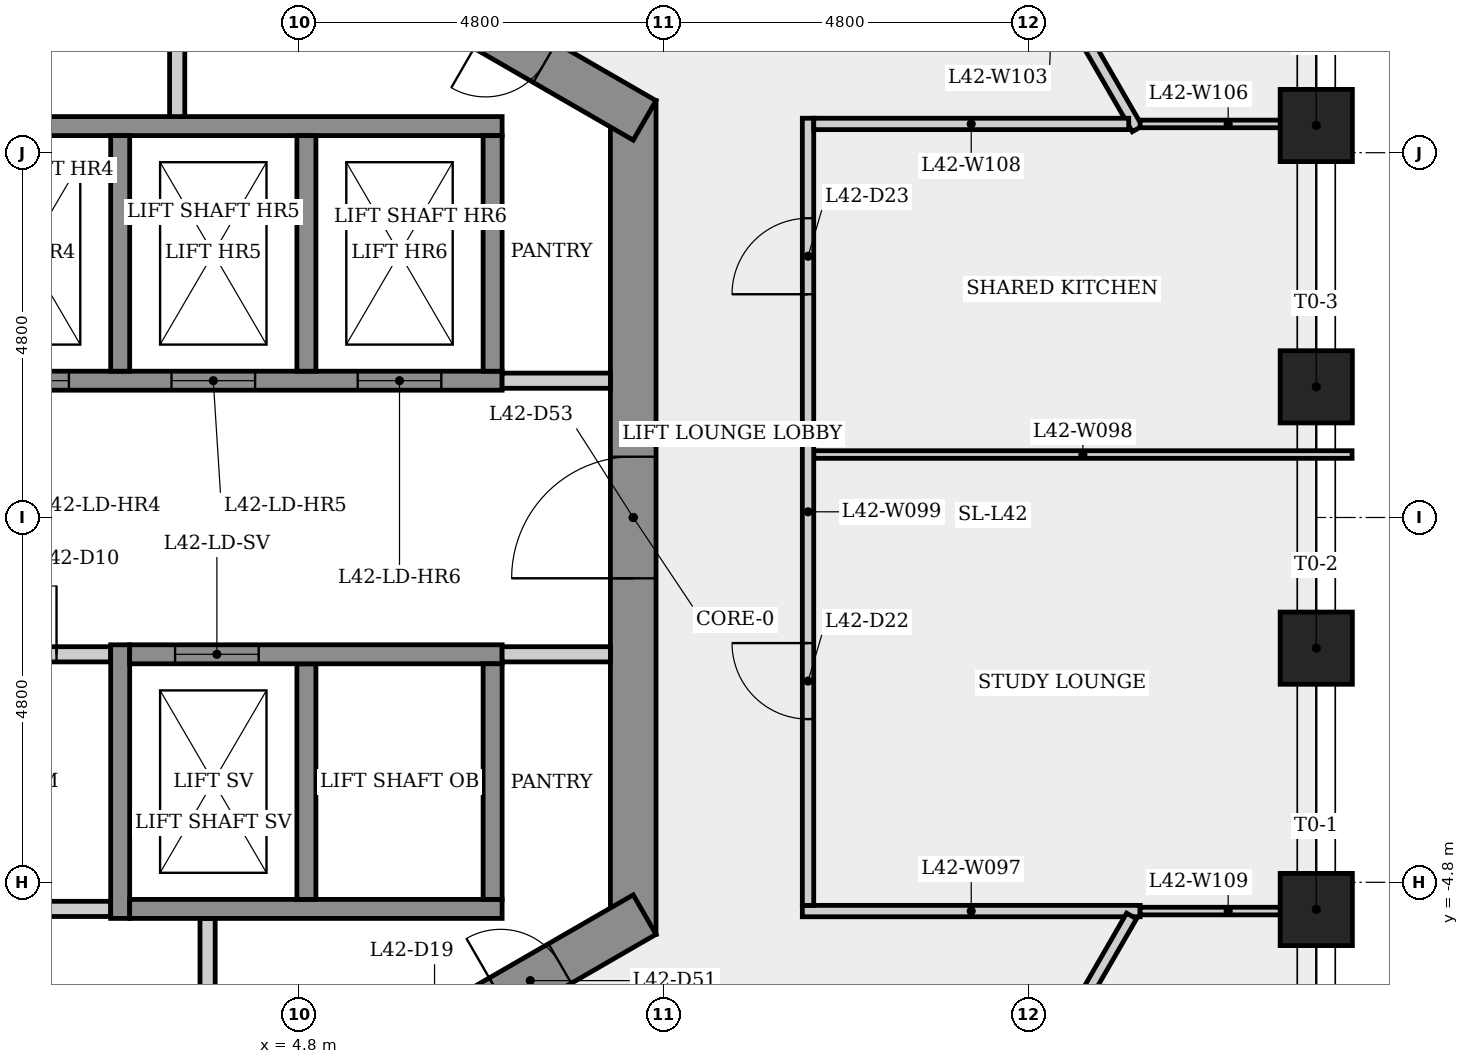
"""IFC4 building model, lengths in metres.
Left out: names, types, materials, properties, quantities, classifications, styles, units other than length and angle.
Written with IfcOpenShell. Run it as: python <this file> out.ifc"""

import sys

from ifc_helpers import new_model, si_unit, direction, frame, frame_2d, origin, origin_2d, place, context, subcontext, project, spatial, rectangle, extrude, element, fill, save


model = new_model("IFC4")
c1 = context("Model", 3, precision=1e-05, world=origin(), true_north=direction((0.0, 1.0)))
c2 = subcontext(c1, "Body", "Model", "MODEL_VIEW")
j1 = project(units=[si_unit("LENGTHUNIT", "METRE"), si_unit("PLANEANGLEUNIT", "RADIAN")], contexts=[c1])
p1 = place(None, origin())
s1 = spatial("IfcSite", under=j1, at=p1, CompositionType="ELEMENT")
p2 = place(p1, origin())
s2 = spatial("IfcBuilding", under=s1, at=p2, CompositionType="ELEMENT")
p3 = place(p2, frame((0.0, 0.0, 159.5)))
s3 = spatial("IfcBuildingStorey", under=s2, at=p3, CompositionType="ELEMENT", Elevation=159.5)
p4 = place(p3, frame((9.2, -5.485, 0.0), z_axis=(0.0, 0.0, 1.0), x_axis=(0.0, 1.0, 0.0)))
e1 = element("IfcWall", 1, at=p4, inside=s3, PredefinedType="SHEAR", context=c2, shape_type="SweptSolid", body=[
    extrude(rectangle(XDim=10.97, YDim=0.6, at=frame_2d((5.485, 0.0))), origin(), (0.0, 0.0, 1.0), 3.4),
])
p5 = place(p4, frame((4.685, 0.0, 0.0)))
e2 = element("IfcOpeningElement", 2, at=p5, cuts=e1, PredefinedType="OPENING", context=c2, shape_type="SweptSolid", body=[
    extrude(rectangle(XDim=1.6, YDim=2.1, at=frame_2d((0.8, 1.05))), frame((0.0, 0.31, 0.0), z_axis=(0.0, -1.0, 0.0), x_axis=(1.0, 0.0, 0.0)), (0.0, 0.0, 1.0), 0.62),
])
p6 = place(p3, frame((9.35, 5.225, 0.0), z_axis=(0.0, 0.0, 1.0), x_axis=(-0.866023993627, 0.500002442456, 0.0)))
e3 = element("IfcWall", 3, at=p6, inside=s3, PredefinedType="SHEAR", context=c2, shape_type="SweptSolid", body=[
    extrude(rectangle(XDim=10.97, YDim=0.6, at=frame_2d((5.485, 0.0))), origin(), (0.0, 0.0, 1.0), 3.4),
])
p7 = place(p6, frame((8.325, 0.0, 0.0)))
e4 = element("IfcOpeningElement", 4, at=p7, cuts=e3, PredefinedType="OPENING", context=c2, shape_type="SweptSolid", body=[
    extrude(rectangle(XDim=0.9, YDim=2.1, at=frame_2d((0.45, 1.05))), frame((0.0, 0.31, 0.0), z_axis=(0.0, -1.0, 0.0), x_axis=(1.0, 0.0, 0.0)), (0.0, 0.0, 1.0), 0.62),
])
p8 = place(p6, frame((1.518, 0.0, 0.0)))
e5 = element("IfcOpeningElement", 5, at=p8, cuts=e3, PredefinedType="OPENING", context=c2, shape_type="SweptSolid", body=[
    extrude(rectangle(XDim=0.9, YDim=2.1, at=frame_2d((0.45, 1.05))), frame((0.0, 0.31, 0.0), z_axis=(0.0, -1.0, 0.0), x_axis=(1.0, 0.0, 0.0)), (0.0, 0.0, 1.0), 0.62),
])
p9 = place(p3, frame((-0.15, -10.71, 0.0), z_axis=(0.0, 0.0, 1.0), x_axis=(0.866023993627, 0.500002442456, 0.0)))
e6 = element("IfcWall", 6, at=p9, inside=s3, PredefinedType="SHEAR", context=c2, shape_type="SweptSolid", body=[
    extrude(rectangle(XDim=10.97, YDim=0.6, at=frame_2d((5.485, 0.0))), origin(), (0.0, 0.0, 1.0), 3.4),
])
p10 = place(p9, frame((1.975, 0.0, 0.0)))
e7 = element("IfcOpeningElement", 7, at=p10, cuts=e6, PredefinedType="OPENING", context=c2, shape_type="SweptSolid", body=[
    extrude(rectangle(XDim=0.9, YDim=2.1, at=frame_2d((0.45, 1.05))), frame((0.0, 0.31, 0.0), z_axis=(0.0, -1.0, 0.0), x_axis=(1.0, 0.0, 0.0)), (0.0, 0.0, 1.0), 0.62),
])
p11 = place(p9, frame((8.782, 0.0, 0.0)))
e8 = element("IfcOpeningElement", 8, at=p11, cuts=e6, PredefinedType="OPENING", context=c2, shape_type="SweptSolid", body=[
    extrude(rectangle(XDim=0.9, YDim=2.1, at=frame_2d((0.45, 1.05))), frame((0.0, 0.31, 0.0), z_axis=(0.0, -1.0, 0.0), x_axis=(1.0, 0.0, 0.0)), (0.0, 0.0, 1.0), 0.62),
])
for number, where, z_axis, x_axis in (
    (9, (18.187, -5.158, 0.0), (0.0, 0.0, 1.0), (1.0, 0.0, 0.0)),
    (10, (18.187, -1.719, 0.0), (0.0, 0.0, 1.0), (1.0, 0.0, 0.0)),
    (11, (18.187, 1.719, 0.0), (0.0, 0.0, 1.0), (1.0, 0.0, 0.0)),
    (12, (18.187, 5.158, 0.0), (0.0, 0.0, 1.0), (1.0, 0.0, 0.0)),
):
    element("IfcColumn", number, at=place(p3, frame(where, z_axis=z_axis, x_axis=x_axis)), inside=s3, PredefinedType="COLUMN", context=c2, shape_type="SweptSolid", body=[
        extrude(rectangle(XDim=0.95, YDim=0.95, at=origin_2d()), origin(), (0.0, 0.0, 1.0), 3.4),
    ])
p12 = place(p3, frame((-8.88, -5.15, 0.0), z_axis=(0.0, 0.0, 1.0), x_axis=(1.0, 0.0, 0.0)))
e13 = element("IfcWall", 13, at=p12, inside=s3, PredefinedType="PARTITIONING", context=c2, shape_type="SweptSolid", body=[
    extrude(rectangle(XDim=11.205, YDim=0.2, at=frame_2d((5.603, 0.0))), origin(), (0.0, 0.0, 1.0), 3.05),
])
p13 = place(p3, frame((-7.475, 1.8, 0.0), z_axis=(0.0, 0.0, 1.0), x_axis=(1.0, 0.0, 0.0)))
e14 = element("IfcWall", 14, at=p13, inside=s3, PredefinedType="SHEAR", context=c2, shape_type="SweptSolid", body=[
    extrude(rectangle(XDim=14.95, YDim=0.25, at=frame_2d((7.475, 0.0))), origin(), (0.0, 0.0, 1.0), 3.05),
])
p14 = place(p13, frame((0.8, 0.0, 0.0)))
e15 = element("IfcOpeningElement", 15, at=p14, cuts=e14, PredefinedType="OPENING", context=c2, shape_type="SweptSolid", body=[
    extrude(rectangle(XDim=1.1, YDim=2.1, at=frame_2d((0.55, 1.05))), frame((0.0, 0.135, 0.0), z_axis=(0.0, -1.0, 0.0), x_axis=(1.0, 0.0, 0.0)), (0.0, 0.0, 1.0), 0.27),
])
p15 = place(p13, frame((3.25, 0.0, 0.0)))
e16 = element("IfcOpeningElement", 16, at=p15, cuts=e14, PredefinedType="OPENING", context=c2, shape_type="SweptSolid", body=[
    extrude(rectangle(XDim=1.1, YDim=2.1, at=frame_2d((0.55, 1.05))), frame((0.0, 0.135, 0.0), z_axis=(0.0, -1.0, 0.0), x_axis=(1.0, 0.0, 0.0)), (0.0, 0.0, 1.0), 0.27),
])
p16 = place(p13, frame((5.7, 0.0, 0.0)))
e17 = element("IfcOpeningElement", 17, at=p16, cuts=e14, PredefinedType="OPENING", context=c2, shape_type="SweptSolid", body=[
    extrude(rectangle(XDim=1.1, YDim=2.1, at=frame_2d((0.55, 1.05))), frame((0.0, 0.135, 0.0), z_axis=(0.0, -1.0, 0.0), x_axis=(1.0, 0.0, 0.0)), (0.0, 0.0, 1.0), 0.27),
])
p17 = place(p13, frame((8.15, 0.0, 0.0)))
e18 = element("IfcOpeningElement", 18, at=p17, cuts=e14, PredefinedType="OPENING", context=c2, shape_type="SweptSolid", body=[
    extrude(rectangle(XDim=1.1, YDim=2.1, at=frame_2d((0.55, 1.05))), frame((0.0, 0.135, 0.0), z_axis=(0.0, -1.0, 0.0), x_axis=(1.0, 0.0, 0.0)), (0.0, 0.0, 1.0), 0.27),
])
p18 = place(p13, frame((10.6, 0.0, 0.0)))
e19 = element("IfcOpeningElement", 19, at=p18, cuts=e14, PredefinedType="OPENING", context=c2, shape_type="SweptSolid", body=[
    extrude(rectangle(XDim=1.1, YDim=2.1, at=frame_2d((0.55, 1.05))), frame((0.0, 0.135, 0.0), z_axis=(0.0, -1.0, 0.0), x_axis=(1.0, 0.0, 0.0)), (0.0, 0.0, 1.0), 0.27),
])
p19 = place(p13, frame((13.05, 0.0, 0.0)))
e20 = element("IfcOpeningElement", 20, at=p19, cuts=e14, PredefinedType="OPENING", context=c2, shape_type="SweptSolid", body=[
    extrude(rectangle(XDim=1.1, YDim=2.1, at=frame_2d((0.55, 1.05))), frame((0.0, 0.135, 0.0), z_axis=(0.0, -1.0, 0.0), x_axis=(1.0, 0.0, 0.0)), (0.0, 0.0, 1.0), 0.27),
])
p20 = place(p3, frame((-7.225, 5.15, 0.0), z_axis=(0.0, 0.0, 1.0), x_axis=(1.0, 0.0, 0.0)))
e21 = element("IfcWall", 21, at=p20, inside=s3, PredefinedType="SHEAR", context=c2, shape_type="SweptSolid", body=[
    extrude(rectangle(XDim=14.7, YDim=0.25, at=frame_2d((7.35, 0.0))), origin(), (0.0, 0.0, 1.0), 3.05),
])
p21 = place(p3, frame((-8.9, -1.8, 0.0), z_axis=(0.0, 0.0, 1.0), x_axis=(1.0, 0.0, 0.0)))
e22 = element("IfcWall", 22, at=p21, inside=s3, PredefinedType="PARTITIONING", context=c2, shape_type="SweptSolid", body=[
    extrude(rectangle(XDim=11.225, YDim=0.2, at=frame_2d((5.613, 0.0))), origin(), (0.0, 0.0, 1.0), 3.05),
])
p22 = place(p21, frame((2.135, 0.0, 0.0)))
e23 = element("IfcOpeningElement", 23, at=p22, cuts=e22, PredefinedType="OPENING", context=c2, shape_type="SweptSolid", body=[
    extrude(rectangle(XDim=0.9, YDim=2.1, at=frame_2d((0.45, 1.05))), frame((0.0, 0.11, 0.0), z_axis=(0.0, -1.0, 0.0), x_axis=(1.0, 0.0, 0.0)), (0.0, 0.0, 1.0), 0.22),
])
p23 = place(p21, frame((6.61, 0.0, 0.0)))
e24 = element("IfcOpeningElement", 24, at=p23, cuts=e22, PredefinedType="OPENING", context=c2, shape_type="SweptSolid", body=[
    extrude(rectangle(XDim=0.9, YDim=2.1, at=frame_2d((0.45, 1.05))), frame((0.0, 0.11, 0.0), z_axis=(0.0, -1.0, 0.0), x_axis=(1.0, 0.0, 0.0)), (0.0, 0.0, 1.0), 0.22),
])
p24 = place(p21, frame((9.613, 0.0, 0.0)))
e25 = element("IfcOpeningElement", 25, at=p24, cuts=e22, PredefinedType="OPENING", context=c2, shape_type="SweptSolid", body=[
    extrude(rectangle(XDim=0.9, YDim=2.1, at=frame_2d((0.45, 1.05))), frame((0.0, 0.11, 0.0), z_axis=(0.0, -1.0, 0.0), x_axis=(1.0, 0.0, 0.0)), (0.0, 0.0, 1.0), 0.22),
])
p25 = place(p3, frame((2.45, -5.275, 0.0), z_axis=(0.0, 0.0, 1.0), x_axis=(0.0, 1.0, 0.0)))
e26 = element("IfcWall", 26, at=p25, inside=s3, PredefinedType="SHEAR", context=c2, shape_type="SweptSolid", body=[
    extrude(rectangle(XDim=3.6, YDim=0.25, at=frame_2d((1.8, 0.0))), origin(), (0.0, 0.0, 1.0), 3.05),
])
p26 = place(p3, frame((2.45, 5.025, 0.0), z_axis=(0.0, 0.0, 1.0), x_axis=(0.0, -1.0, 0.0)))
e27 = element("IfcWall", 27, at=p26, inside=s3, PredefinedType="SHEAR", context=c2, shape_type="SweptSolid", body=[
    extrude(rectangle(XDim=3.1, YDim=0.25, at=frame_2d((1.55, 0.0))), origin(), (0.0, 0.0, 1.0), 3.4),
])
p27 = place(p3, frame((3.2, 8.429, 0.0), z_axis=(0.0, 0.0, 1.0), x_axis=(0.0, -1.0, 0.0)))
e28 = element("IfcWall", 28, at=p27, inside=s3, PredefinedType="PARTITIONING", context=c2, shape_type="SweptSolid", body=[
    extrude(rectangle(XDim=3.154, YDim=0.2, at=frame_2d((1.577, 0.0))), origin(), (0.0, 0.0, 1.0), 3.05),
])
p28 = place(p3, frame((3.6, -5.275, 0.0), z_axis=(0.0, 0.0, 1.0), x_axis=(0.0, -1.0, 0.0)))
e29 = element("IfcWall", 29, at=p28, inside=s3, PredefinedType="PARTITIONING", context=c2, shape_type="SweptSolid", body=[
    extrude(rectangle(XDim=2.924, YDim=0.2, at=frame_2d((1.462, 0.0))), origin(), (0.0, 0.0, 1.0), 3.05),
])
p29 = place(p3, frame((2.575, -5.15, 0.0), z_axis=(0.0, 0.0, 1.0), x_axis=(1.0, 0.0, 0.0)))
e30 = element("IfcWall", 30, at=p29, inside=s3, PredefinedType="SHEAR", context=c2, shape_type="SweptSolid", body=[
    extrude(rectangle(XDim=4.9, YDim=0.25, at=frame_2d((2.45, 0.0))), origin(), (0.0, 0.0, 1.0), 3.05),
])
for number, where, z_axis, x_axis in (
    (31, (4.9, -1.925, 0.0), (0.0, 0.0, 1.0), (0.0, -1.0, 0.0)),
    (32, (4.9, 5.025, 0.0), (0.0, 0.0, 1.0), (0.0, -1.0, 0.0)),
):
    element("IfcWall", number, at=place(p3, frame(where, z_axis=z_axis, x_axis=x_axis)), inside=s3, PredefinedType="SHEAR", context=c2, shape_type="SweptSolid", body=[
        extrude(rectangle(XDim=3.1, YDim=0.25, at=frame_2d((1.55, 0.0))), origin(), (0.0, 0.0, 1.0), 3.4),
    ])
p30 = place(p3, frame((2.575, -1.8, 0.0), z_axis=(0.0, 0.0, 1.0), x_axis=(1.0, 0.0, 0.0)))
e33 = element("IfcWall", 33, at=p30, inside=s3, PredefinedType="SHEAR", context=c2, shape_type="SweptSolid", body=[
    extrude(rectangle(XDim=4.9, YDim=0.25, at=frame_2d((2.45, 0.0))), origin(), (0.0, 0.0, 1.0), 3.05),
])
p31 = place(p30, frame((0.597, 0.0, 0.0)))
e34 = element("IfcOpeningElement", 34, at=p31, cuts=e33, PredefinedType="OPENING", context=c2, shape_type="SweptSolid", body=[
    extrude(rectangle(XDim=1.1, YDim=2.1, at=frame_2d((0.55, 1.05))), frame((0.0, 0.135, 0.0), z_axis=(0.0, -1.0, 0.0), x_axis=(1.0, 0.0, 0.0)), (0.0, 0.0, 1.0), 0.27),
])
p32 = place(p3, frame((7.475, 1.8, 0.0), z_axis=(0.0, 0.0, 1.0), x_axis=(1.0, 0.0, 0.0)))
e35 = element("IfcWall", 35, at=p32, inside=s3, PredefinedType="PARTITIONING", context=c2, shape_type="SweptSolid", body=[
    extrude(rectangle(XDim=1.425, YDim=0.2, at=frame_2d((0.712, 0.0))), origin(), (0.0, 0.0, 1.0), 3.05),
])
for number, where, z_axis, x_axis in (
    (36, (7.35, -1.925, 0.0), (0.0, 0.0, 1.0), (0.0, -1.0, 0.0)),
    (37, (7.35, 5.025, 0.0), (0.0, 0.0, 1.0), (0.0, -1.0, 0.0)),
):
    element("IfcWall", number, at=place(p3, frame(where, z_axis=z_axis, x_axis=x_axis)), inside=s3, PredefinedType="SHEAR", context=c2, shape_type="SweptSolid", body=[
        extrude(rectangle(XDim=3.1, YDim=0.25, at=frame_2d((1.55, 0.0))), origin(), (0.0, 0.0, 1.0), 3.4),
    ])
p33 = place(p3, frame((8.9, -1.8, 0.0), z_axis=(0.0, 0.0, 1.0), x_axis=(-1.0, 0.0, 0.0)))
e38 = element("IfcWall", 38, at=p33, inside=s3, PredefinedType="PARTITIONING", context=c2, shape_type="SweptSolid", body=[
    extrude(rectangle(XDim=1.425, YDim=0.2, at=frame_2d((0.712, 0.0))), origin(), (0.0, 0.0, 1.0), 3.05),
])
p34 = place(p3, frame((11.425, -5.178, 0.0), z_axis=(0.0, 0.0, 1.0), x_axis=(1.0, 0.0, 0.0)))
e39 = element("IfcWall", 39, at=p34, inside=s3, PredefinedType="PARTITIONING", context=c2, shape_type="SweptSolid", body=[
    extrude(rectangle(XDim=4.444, YDim=0.15, at=frame_2d((2.222, 0.0))), origin(), (0.0, 0.0, 1.0), 3.05),
])
p35 = place(p3, frame((11.575, 0.829, 0.0), z_axis=(0.0, 0.0, 1.0), x_axis=(1.0, 0.0, 0.0)))
e40 = element("IfcWall", 40, at=p35, inside=s3, PredefinedType="PARTITIONING", context=c2, shape_type="SweptSolid", body=[
    extrude(rectangle(XDim=7.083, YDim=0.1, at=frame_2d((3.541, 0.0))), origin(), (0.0, 0.0, 1.0), 3.05),
])
p36 = place(p3, frame((11.5, -5.104, 0.0), z_axis=(0.0, 0.0, 1.0), x_axis=(0.0, 1.0, 0.0)))
e41 = element("IfcWall", 41, at=p36, inside=s3, PredefinedType="PARTITIONING", context=c2, shape_type="SweptSolid", body=[
    extrude(rectangle(XDim=10.357, YDim=0.15, at=frame_2d((5.178, 0.0))), origin(), (0.0, 0.0, 1.0), 3.05),
])
p37 = place(p36, frame((2.451, 0.0, 0.0)))
e42 = element("IfcOpeningElement", 42, at=p37, cuts=e41, PredefinedType="OPENING", context=c2, shape_type="SweptSolid", body=[
    extrude(rectangle(XDim=1.0, YDim=2.1, at=frame_2d((0.5, 1.05))), frame((0.0, 0.085, 0.0), z_axis=(0.0, -1.0, 0.0), x_axis=(1.0, 0.0, 0.0)), (0.0, 0.0, 1.0), 0.17),
])
p38 = place(p36, frame((8.041, 0.0, 0.0)))
e43 = element("IfcOpeningElement", 43, at=p38, cuts=e41, PredefinedType="OPENING", context=c2, shape_type="SweptSolid", body=[
    extrude(rectangle(XDim=1.0, YDim=2.1, at=frame_2d((0.5, 1.05))), frame((0.0, 0.085, 0.0), z_axis=(0.0, -1.0, 0.0), x_axis=(1.0, 0.0, 0.0)), (0.0, 0.0, 1.0), 0.17),
])
p39 = place(p3, frame((13.611, 8.959, 0.0), z_axis=(0.0, 0.0, 1.0), x_axis=(0.50000642917, -0.866021691869, 0.0)))
e44 = element("IfcWall", 44, at=p39, inside=s3, PredefinedType="PARTITIONING", context=c2, shape_type="SweptSolid", body=[
    extrude(rectangle(XDim=4.44, YDim=0.15, at=frame_2d((2.22, 0.0))), origin(), (0.0, 0.0, 1.0), 3.05),
])
p40 = place(p39, frame((1.665, 0.0, 0.0)))
e45 = element("IfcOpeningElement", 45, at=p40, cuts=e44, PredefinedType="OPENING", context=c2, shape_type="SweptSolid", body=[
    extrude(rectangle(XDim=1.0, YDim=2.1, at=frame_2d((0.5, 1.05))), frame((0.0, 0.085, 0.0), z_axis=(0.0, -1.0, 0.0), x_axis=(1.0, 0.0, 0.0)), (0.0, 0.0, 1.0), 0.17),
])
p41 = place(p3, frame((15.869, 5.178, 0.0), z_axis=(0.0, 0.0, 1.0), x_axis=(1.0, 0.0, 0.0)))
e46 = element("IfcWall", 46, at=p41, inside=s3, PredefinedType="PARTITIONING", context=c2, shape_type="SweptSolid", body=[
    extrude(rectangle(XDim=2.318, YDim=0.1, at=frame_2d((1.159, 0.0))), origin(), (0.0, 0.0, 1.0), 3.05),
])
p42 = place(p3, frame((15.757, -5.243, 0.0), z_axis=(0.0, 0.0, 1.0), x_axis=(-0.500001355988, -0.866024620903, 0.0)))
e47 = element("IfcWall", 47, at=p42, inside=s3, PredefinedType="PARTITIONING", context=c2, shape_type="SweptSolid", body=[
    extrude(rectangle(XDim=7.805, YDim=0.15, at=frame_2d((3.902, 0.0))), origin(), (0.0, 0.0, 1.0), 3.05),
])
p43 = place(p42, frame((3.402, 0.0, 0.0)))
e48 = element("IfcOpeningElement", 48, at=p43, cuts=e47, PredefinedType="OPENING", context=c2, shape_type="SweptSolid", body=[
    extrude(rectangle(XDim=1.0, YDim=2.1, at=frame_2d((0.5, 1.05))), frame((0.0, 0.085, 0.0), z_axis=(0.0, -1.0, 0.0), x_axis=(1.0, 0.0, 0.0)), (0.0, 0.0, 1.0), 0.17),
])
p44 = place(p3, frame((15.719, 5.178, 0.0), z_axis=(0.0, 0.0, 1.0), x_axis=(-1.0, 0.0, 0.0)))
e49 = element("IfcWall", 49, at=p44, inside=s3, PredefinedType="PARTITIONING", context=c2, shape_type="SweptSolid", body=[
    extrude(rectangle(XDim=4.144, YDim=0.15, at=frame_2d((2.072, 0.0))), origin(), (0.0, 0.0, 1.0), 3.05),
])
p45 = place(p3, frame((18.187, -5.178, 0.0), z_axis=(0.0, 0.0, 1.0), x_axis=(-1.0, 0.0, 0.0)))
e50 = element("IfcWall", 50, at=p45, inside=s3, PredefinedType="PARTITIONING", context=c2, shape_type="SweptSolid", body=[
    extrude(rectangle(XDim=2.317, YDim=0.1, at=frame_2d((1.159, 0.0))), origin(), (0.0, 0.0, 1.0), 3.05),
])
p46 = place(p17, origin())
e51 = element("IfcDoor", 51, at=p46, inside=s3, OperationType="SLIDING_TO_LEFT", PredefinedType="DOOR", context=c2, shape_type="SweptSolid", body=[
    extrude(rectangle(XDim=1.1, YDim=2.1, at=frame_2d((0.55, 1.05))), frame((0.0, 0.025, 0.0), z_axis=(0.0, -1.0, 0.0), x_axis=(1.0, 0.0, 0.0)), (0.0, 0.0, 1.0), 0.05),
])
fill(e18, e51)
p47 = place(p18, origin())
e52 = element("IfcDoor", 52, at=p47, inside=s3, OperationType="SLIDING_TO_LEFT", PredefinedType="DOOR", context=c2, shape_type="SweptSolid", body=[
    extrude(rectangle(XDim=1.1, YDim=2.1, at=frame_2d((0.55, 1.05))), frame((0.0, 0.025, 0.0), z_axis=(0.0, -1.0, 0.0), x_axis=(1.0, 0.0, 0.0)), (0.0, 0.0, 1.0), 0.05),
])
fill(e19, e52)
p48 = place(p19, origin())
e53 = element("IfcDoor", 53, at=p48, inside=s3, OperationType="SLIDING_TO_LEFT", PredefinedType="DOOR", context=c2, shape_type="SweptSolid", body=[
    extrude(rectangle(XDim=1.1, YDim=2.1, at=frame_2d((0.55, 1.05))), frame((0.0, 0.025, 0.0), z_axis=(0.0, -1.0, 0.0), x_axis=(1.0, 0.0, 0.0)), (0.0, 0.0, 1.0), 0.05),
])
fill(e20, e53)
p49 = place(p31, origin())
e54 = element("IfcDoor", 54, at=p49, inside=s3, OperationType="SLIDING_TO_LEFT", PredefinedType="DOOR", context=c2, shape_type="SweptSolid", body=[
    extrude(rectangle(XDim=1.1, YDim=2.1, at=frame_2d((0.55, 1.05))), frame((0.0, 0.025, 0.0), z_axis=(0.0, -1.0, 0.0), x_axis=(1.0, 0.0, 0.0)), (0.0, 0.0, 1.0), 0.05),
])
fill(e34, e54)
p50 = place(p24, origin())
e55 = element("IfcDoor", 55, at=p50, inside=s3, OperationType="SINGLE_SWING_RIGHT", PredefinedType="DOOR", context=c2, shape_type="SweptSolid", body=[
    extrude(rectangle(XDim=0.9, YDim=2.1, at=frame_2d((0.45, 1.05))), frame((0.0, 0.025, 0.0), z_axis=(0.0, -1.0, 0.0), x_axis=(1.0, 0.0, 0.0)), (0.0, 0.0, 1.0), 0.05),
])
fill(e25, e55)
p51 = place(p37, origin())
e56 = element("IfcDoor", 56, at=p51, inside=s3, OperationType="SINGLE_SWING_RIGHT", PredefinedType="DOOR", context=c2, shape_type="SweptSolid", body=[
    extrude(rectangle(XDim=1.0, YDim=2.1, at=frame_2d((0.5, 1.05))), frame((0.0, 0.025, 0.0), z_axis=(0.0, -1.0, 0.0), x_axis=(1.0, 0.0, 0.0)), (0.0, 0.0, 1.0), 0.05),
])
fill(e42, e56)
p52 = place(p38, origin())
e57 = element("IfcDoor", 57, at=p52, inside=s3, OperationType="SINGLE_SWING_LEFT", PredefinedType="DOOR", context=c2, shape_type="SweptSolid", body=[
    extrude(rectangle(XDim=1.0, YDim=2.1, at=frame_2d((0.5, 1.05))), frame((0.0, 0.025, 0.0), z_axis=(0.0, -1.0, 0.0), x_axis=(1.0, 0.0, 0.0)), (0.0, 0.0, 1.0), 0.05),
])
fill(e43, e57)
p53 = place(p8, origin())
e58 = element("IfcDoor", 58, at=p53, inside=s3, OperationType="SINGLE_SWING_RIGHT", PredefinedType="DOOR", context=c2, shape_type="SweptSolid", body=[
    extrude(rectangle(XDim=0.9, YDim=2.1, at=frame_2d((0.45, 1.05))), frame((0.0, 0.025, 0.0), z_axis=(0.0, -1.0, 0.0), x_axis=(1.0, 0.0, 0.0)), (0.0, 0.0, 1.0), 0.05),
])
fill(e5, e58)
p54 = place(p11, origin())
e59 = element("IfcDoor", 59, at=p54, inside=s3, OperationType="SINGLE_SWING_LEFT", PredefinedType="DOOR", context=c2, shape_type="SweptSolid", body=[
    extrude(rectangle(XDim=0.9, YDim=2.1, at=frame_2d((0.45, 1.05))), frame((0.0, 0.025, 0.0), z_axis=(0.0, -1.0, 0.0), x_axis=(1.0, 0.0, 0.0)), (0.0, 0.0, 1.0), 0.05),
])
fill(e8, e59)
p55 = place(p5, origin())
e60 = element("IfcDoor", 60, at=p55, inside=s3, OperationType="SINGLE_SWING_LEFT", PredefinedType="DOOR", context=c2, shape_type="SweptSolid", body=[
    extrude(rectangle(XDim=1.6, YDim=2.1, at=frame_2d((0.8, 1.05))), frame((0.0, 0.025, 0.0), z_axis=(0.0, -1.0, 0.0), x_axis=(1.0, 0.0, 0.0)), (0.0, 0.0, 1.0), 0.05),
])
fill(e2, e60)
save(model, sys.argv[1])
